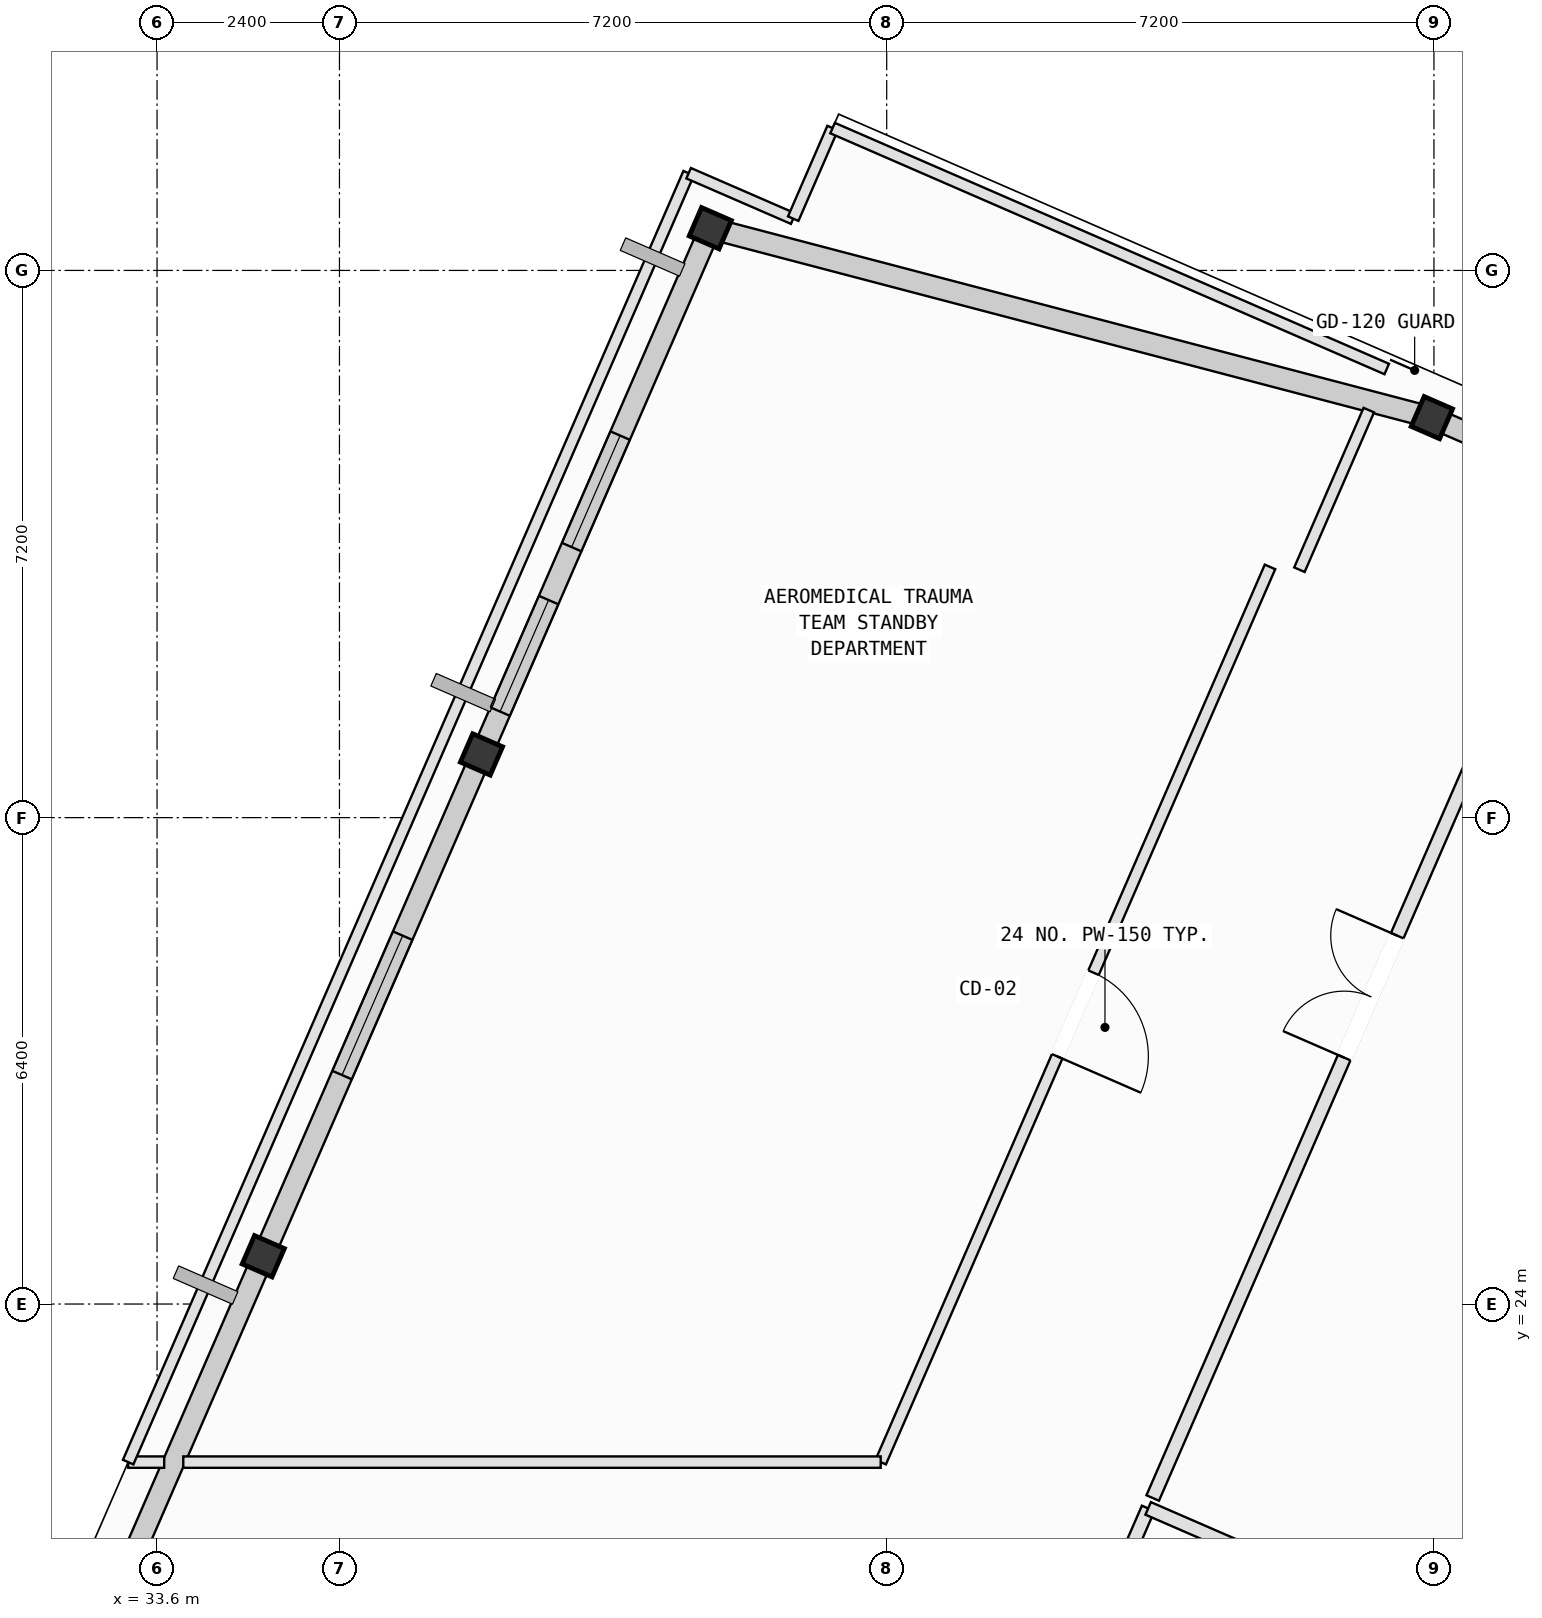
"""IFC4 building model, lengths in metres.
Left out: names, types, materials, properties, quantities, classifications, styles, units other than length and angle.
Written with IfcOpenShell. Run it as: python <this file> out.ifc"""

import sys

from ifc_helpers import new_model, si_unit, direction, frame, frame_2d, origin, origin_2d, place, context, subcontext, project, spatial, rectangle, i_section, extrude, element, fill, save


model = new_model("IFC4")
c1 = context("Model", 3, precision=1e-05, world=origin(), true_north=direction((0.0, 1.0)))
c2 = subcontext(c1, "Body", "Model", "MODEL_VIEW")
j1 = project(units=[si_unit("LENGTHUNIT", "METRE"), si_unit("PLANEANGLEUNIT", "RADIAN")], contexts=[c1])
p1 = place(None, origin())
s1 = spatial("IfcSite", under=j1, at=p1, CompositionType="ELEMENT")
p2 = place(p1, origin())
s2 = spatial("IfcBuilding", under=s1, at=p2, CompositionType="ELEMENT")
p3 = place(p2, frame((0.0, 0.0, 342.6)))
s3 = spatial("IfcBuildingStorey", under=s2, at=p3, CompositionType="ELEMENT", Elevation=342.6)
for number, where, z_axis, x_axis in (
    (1, (50.373, 35.663, 0.002), (0.0, 0.0, 1.0), (-0.917, 0.399, 0.0)),
    (2, (40.879, 38.155, 0.002), (0.0, 0.0, 1.0), (0.399, 0.917, 0.0)),
    (3, (37.868, 31.231, 0.002), (0.0, 0.0, 1.0), (0.399, 0.917, 0.0)),
    (4, (34.998, 24.628, 0.002), (0.0, 0.0, 1.0), (0.399, 0.917, 0.0)),
):
    element("IfcColumn", number, at=place(p3, frame(where, z_axis=z_axis, x_axis=x_axis)), inside=s3, PredefinedType="COLUMN", context=c2, shape_type="SweptSolid", body=[
        extrude(i_section(OverallWidth=0.407, OverallDepth=0.428, WebThickness=0.02, FlangeThickness=0.035, FilletRadius=0.022, at=origin_2d()), origin(), (0.0, 0.0, 1.0), 5.196),
    ])
p4 = place(p3, frame((50.373, 35.663, 0.0), z_axis=(0.0, 0.0, 1.0), x_axis=(0.917055127211, -0.398760446454, 0.0)))
e5 = element("IfcWall", 5, at=p4, inside=s3, PredefinedType="SOLIDWALL", context=c2, shape_type="SweptSolid", body=[
    extrude(rectangle(XDim=7.8, YDim=0.28, at=frame_2d((3.9, 0.0))), origin(), (0.0, 0.0, 1.0), 4.335),
])
p5 = place(p3, frame((40.879, 38.155, 0.0), z_axis=(0.0, 0.0, 1.0), x_axis=(0.967228369271, -0.253908018143, 0.0)))
e6 = element("IfcWall", 6, at=p5, inside=s3, PredefinedType="SOLIDWALL", context=c2, shape_type="SweptSolid", body=[
    extrude(rectangle(XDim=9.815, YDim=0.28, at=frame_2d((4.908, 0.0))), origin(), (0.0, 0.0, 1.0), 4.335),
])
p6 = place(p3, frame((37.868, 31.231, 0.0), z_axis=(0.0, 0.0, 1.0), x_axis=(0.398768677413, 0.917051548123, 0.0)))
e7 = element("IfcWall", 7, at=p6, inside=s3, PredefinedType="SOLIDWALL", context=c2, shape_type="SweptSolid", body=[
    extrude(rectangle(XDim=7.55, YDim=0.28, at=frame_2d((3.775, 0.0))), origin(), (0.0, 0.0, 1.0), 4.335),
])
p7 = place(p6, frame((2.975, 0.0, 0.75)))
e8 = element("IfcOpeningElement", 8, at=p7, cuts=e7, PredefinedType="OPENING", context=c2, shape_type="SweptSolid", body=[
    extrude(rectangle(XDim=1.6, YDim=1.95, at=frame_2d((0.8, 0.975))), frame((0.0, 0.15, 0.0), z_axis=(0.0, -1.0, 0.0), x_axis=(1.0, 0.0, 0.0)), (0.0, 0.0, 1.0), 0.3),
])
p8 = place(p6, frame((0.615, 0.0, 0.75)))
e9 = element("IfcOpeningElement", 9, at=p8, cuts=e7, PredefinedType="OPENING", context=c2, shape_type="SweptSolid", body=[
    extrude(rectangle(XDim=1.6, YDim=1.95, at=frame_2d((0.8, 0.975))), frame((0.0, 0.15, 0.0), z_axis=(0.0, -1.0, 0.0), x_axis=(1.0, 0.0, 0.0)), (0.0, 0.0, 1.0), 0.3),
])
p9 = place(p3, frame((34.998, 24.628, 0.0), z_axis=(0.0, 0.0, 1.0), x_axis=(0.398734790782, 0.917066282566, 0.0)))
e10 = element("IfcWall", 10, at=p9, inside=s3, PredefinedType="SOLIDWALL", context=c2, shape_type="SweptSolid", body=[
    extrude(rectangle(XDim=7.2, YDim=0.28, at=frame_2d((3.6, 0.0))), origin(), (0.0, 0.0, 1.0), 4.335),
])
p10 = place(p9, frame((2.6, 0.0, 0.75)))
e11 = element("IfcOpeningElement", 11, at=p10, cuts=e10, PredefinedType="OPENING", context=c2, shape_type="SweptSolid", body=[
    extrude(rectangle(XDim=2.0, YDim=1.95, at=frame_2d((1.0, 0.975))), frame((0.0, 0.15, 0.0), z_axis=(0.0, -1.0, 0.0), x_axis=(1.0, 0.0, 0.0)), (0.0, 0.0, 1.0), 0.3),
])
p11 = place(p3, frame((32.226, 18.255, 0.0), z_axis=(0.0, 0.0, 1.0), x_axis=(0.398742809918, 0.917062795853, 0.0)))
e12 = element("IfcWall", 12, at=p11, inside=s3, PredefinedType="SOLIDWALL", context=c2, shape_type="SweptSolid", body=[
    extrude(rectangle(XDim=6.95, YDim=0.28, at=frame_2d((3.475, 0.0))), origin(), (0.0, 0.0, 1.0), 4.335),
])
p12 = place(p11, frame((1.066, 0.0, 0.75)))
e13 = element("IfcOpeningElement", 13, at=p12, cuts=e12, PredefinedType="OPENING", context=c2, shape_type="SweptSolid", body=[
    extrude(rectangle(XDim=1.4, YDim=1.85, at=frame_2d((0.7, 0.925))), frame((0.0, 0.15, 0.0), z_axis=(0.0, -1.0, 0.0), x_axis=(1.0, 0.0, 0.0)), (0.0, 0.0, 1.0), 0.3),
])
p13 = place(p3, frame((25.119, 21.345, 0.0), z_axis=(0.0, 0.0, 1.0), x_axis=(0.917063044715, -0.398742237565, 0.0)))
e14 = element("IfcWall", 14, at=p13, inside=s3, PredefinedType="SOLIDWALL", context=c2, shape_type="SweptSolid", body=[
    extrude(rectangle(XDim=7.75, YDim=0.28, at=frame_2d((3.875, 0.0))), origin(), (0.0, 0.0, 1.0), 3.835),
])
p14 = place(p3, frame((44.32, 15.975, 0.0), z_axis=(0.0, 0.0, 1.0), x_axis=(0.398704630949, 0.917079395287, 0.0)))
e15 = element("IfcWall", 15, at=p14, inside=s3, PredefinedType="PARTITIONING", context=c2, shape_type="SweptSolid", body=[
    extrude(rectangle(XDim=5.818, YDim=0.18, at=frame_2d((2.909, 0.0))), origin(), (0.0, 0.0, 1.0), 4.485),
])
p15 = place(p3, frame((46.64, 21.311, 0.0), z_axis=(0.0, 0.0, 1.0), x_axis=(0.917077124734, -0.398709853514, 0.0)))
e16 = element("IfcWall", 16, at=p15, inside=s3, PredefinedType="PARTITIONING", context=c2, shape_type="SweptSolid", body=[
    extrude(rectangle(XDim=8.786, YDim=0.18, at=frame_2d((4.393, 0.0))), origin(), (0.0, 0.0, 1.0), 4.85),
])
p16 = place(p3, frame((46.7, 21.448, 0.0), z_axis=(0.0, 0.0, 1.0), x_axis=(0.398723008689, 0.917071405258, 0.0)))
e17 = element("IfcWall", 17, at=p16, inside=s3, PredefinedType="PARTITIONING", context=c2, shape_type="SweptSolid", body=[
    extrude(rectangle(XDim=14.386, YDim=0.18, at=frame_2d((7.193, 0.0))), origin(), (0.0, 0.0, 1.0), 4.85),
])
p17 = place(p16, frame((6.318, 0.0, 0.0)))
e18 = element("IfcOpeningElement", 18, at=p17, cuts=e17, PredefinedType="OPENING", context=c2, shape_type="SweptSolid", body=[
    extrude(rectangle(XDim=1.75, YDim=2.2, at=frame_2d((0.875, 1.1))), frame((0.0, 0.1, 0.0), z_axis=(0.0, -1.0, 0.0), x_axis=(1.0, 0.0, 0.0)), (0.0, 0.0, 1.0), 0.2),
])
p18 = place(p3, frame((48.243, 33.699, 0.0), z_axis=(0.0, 0.0, 1.0), x_axis=(-0.398758777505, -0.917055852913, 0.0)))
e19 = element("IfcWall", 19, at=p18, inside=s3, PredefinedType="PARTITIONING", context=c2, shape_type="SweptSolid", body=[
    extrude(rectangle(XDim=12.844, YDim=0.15, at=frame_2d((6.422, 0.0))), origin(), (0.0, 0.0, 1.0), 3.835),
])
p19 = place(p18, frame((5.822, 0.0, 0.0)))
e20 = element("IfcOpeningElement", 20, at=p19, cuts=e19, PredefinedType="OPENING", context=c2, shape_type="SweptSolid", body=[
    extrude(rectangle(XDim=1.2, YDim=2.15, at=frame_2d((0.6, 1.075))), frame((0.0, 0.085, 0.0), z_axis=(0.0, -1.0, 0.0), x_axis=(1.0, 0.0, 0.0)), (0.0, 0.0, 1.0), 0.17),
])
p20 = place(p3, frame((43.121, 21.92, 0.0), z_axis=(0.0, 0.0, 1.0), x_axis=(-1.0, 0.0, 0.0)))
e21 = element("IfcWall", 21, at=p20, inside=s3, PredefinedType="PARTITIONING", context=c2, shape_type="SweptSolid", body=[
    extrude(rectangle(XDim=9.176, YDim=0.15, at=frame_2d((4.588, 0.0))), origin(), (0.0, 0.0, 1.0), 4.85),
])
p21 = place(p3, frame((33.694, 21.92, 0.0), z_axis=(0.0, 0.0, 1.0), x_axis=(-1.0, 0.0, 0.0)))
e22 = element("IfcWall", 22, at=p21, inside=s3, PredefinedType="PARTITIONING", context=c2, shape_type="SweptSolid", body=[
    extrude(rectangle(XDim=0.474, YDim=0.15, at=frame_2d((0.237, 0.0))), origin(), (0.0, 0.0, 1.0), 4.85),
])
p22 = place(p3, frame((33.22, 21.92, 0.0), z_axis=(0.0, 0.0, 1.0), x_axis=(0.39875121383, 0.917059141751, 0.0)))
e23 = element("IfcWall", 23, at=p22, inside=s3, PredefinedType="PARTITIONING", context=c2, shape_type="SweptSolid", body=[
    extrude(rectangle(XDim=18.493, YDim=0.15, at=frame_2d((9.246, 0.0))), origin(), (0.0, 0.0, 1.0), 4.85),
])
p23 = place(p3, frame((40.594, 38.879, 0.0), z_axis=(0.0, 0.0, 1.0), x_axis=(0.91715541112, -0.398529737728, 0.0)))
e24 = element("IfcWall", 24, at=p23, inside=s3, PredefinedType="PARTITIONING", context=c2, shape_type="SweptSolid", body=[
    extrude(rectangle(XDim=1.5, YDim=0.15, at=frame_2d((0.75, 0.0))), origin(), (0.0, 0.0, 1.0), 4.335),
])
p24 = place(p3, frame((41.97, 38.281, 0.0), z_axis=(0.0, 0.0, 1.0), x_axis=(0.398629941404, 0.917111863306, 0.0)))
e25 = element("IfcWall", 25, at=p24, inside=s3, PredefinedType="PARTITIONING", context=c2, shape_type="SweptSolid", body=[
    extrude(rectangle(XDim=1.3, YDim=0.15, at=frame_2d((0.65, 0.0))), origin(), (0.0, 0.0, 1.0), 4.85),
])
p25 = place(p3, frame((42.488, 39.473, 0.0), z_axis=(0.0, 0.0, 1.0), x_axis=(0.917073961881, -0.398717128351, 0.0)))
e26 = element("IfcWall", 26, at=p25, inside=s3, PredefinedType="PARTITIONING", context=c2, shape_type="SweptSolid", body=[
    extrude(rectangle(XDim=7.95, YDim=0.15, at=frame_2d((3.975, 0.0))), origin(), (0.0, 0.0, 1.0), 4.85),
])
p26 = place(p3, frame((49.543, 35.762, 0.0), z_axis=(0.0, 0.0, 1.0), x_axis=(-0.398765098315, -0.917053104441, 0.0)))
e27 = element("IfcWall", 27, at=p26, inside=s3, PredefinedType="PARTITIONING", context=c2, shape_type="SweptSolid", body=[
    extrude(rectangle(XDim=2.29, YDim=0.15, at=frame_2d((1.145, 0.0))), origin(), (0.0, 0.0, 1.0), 3.835),
])
p27 = place(p7, origin())
e28 = element("IfcWindow", 28, at=p27, inside=s3, PartitioningType="SINGLE_PANEL", PredefinedType="WINDOW", context=c2, shape_type="SweptSolid", body=[
    extrude(rectangle(XDim=1.6, YDim=1.95, at=frame_2d((0.8, 0.975))), frame((0.0, 0.03, 0.0), z_axis=(0.0, -1.0, 0.0), x_axis=(1.0, 0.0, 0.0)), (0.0, 0.0, 1.0), 0.06),
])
fill(e8, e28)
p28 = place(p8, origin())
e29 = element("IfcWindow", 29, at=p28, inside=s3, PartitioningType="SINGLE_PANEL", PredefinedType="WINDOW", context=c2, shape_type="SweptSolid", body=[
    extrude(rectangle(XDim=1.6, YDim=1.95, at=frame_2d((0.8, 0.975))), frame((0.0, 0.03, 0.0), z_axis=(0.0, -1.0, 0.0), x_axis=(1.0, 0.0, 0.0)), (0.0, 0.0, 1.0), 0.06),
])
fill(e9, e29)
p29 = place(p10, origin())
e30 = element("IfcWindow", 30, at=p29, inside=s3, PartitioningType="SINGLE_PANEL", PredefinedType="WINDOW", context=c2, shape_type="SweptSolid", body=[
    extrude(rectangle(XDim=2.0, YDim=1.95, at=frame_2d((1.0, 0.975))), frame((0.0, 0.03, 0.0), z_axis=(0.0, -1.0, 0.0), x_axis=(1.0, 0.0, 0.0)), (0.0, 0.0, 1.0), 0.06),
])
fill(e11, e30)
p30 = place(p17, origin())
e31 = element("IfcDoor", 31, at=p30, inside=s3, OperationType="DOUBLE_DOOR_SINGLE_SWING", PredefinedType="DOOR", context=c2, shape_type="SweptSolid", body=[
    extrude(rectangle(XDim=1.75, YDim=2.2, at=frame_2d((0.875, 1.1))), frame((0.0, 0.025, 0.0), z_axis=(0.0, -1.0, 0.0), x_axis=(1.0, 0.0, 0.0)), (0.0, 0.0, 1.0), 0.05),
])
fill(e18, e31)
p31 = place(p19, origin())
e32 = element("IfcDoor", 32, at=p31, inside=s3, OperationType="SINGLE_SWING_RIGHT", PredefinedType="DOOR", context=c2, shape_type="SweptSolid", body=[
    extrude(rectangle(XDim=1.2, YDim=2.15, at=frame_2d((0.6, 1.075))), frame((0.0, 0.025, 0.0), z_axis=(0.0, -1.0, 0.0), x_axis=(1.0, 0.0, 0.0)), (0.0, 0.0, 1.0), 0.05),
])
fill(e20, e32)
save(model, sys.argv[1])
